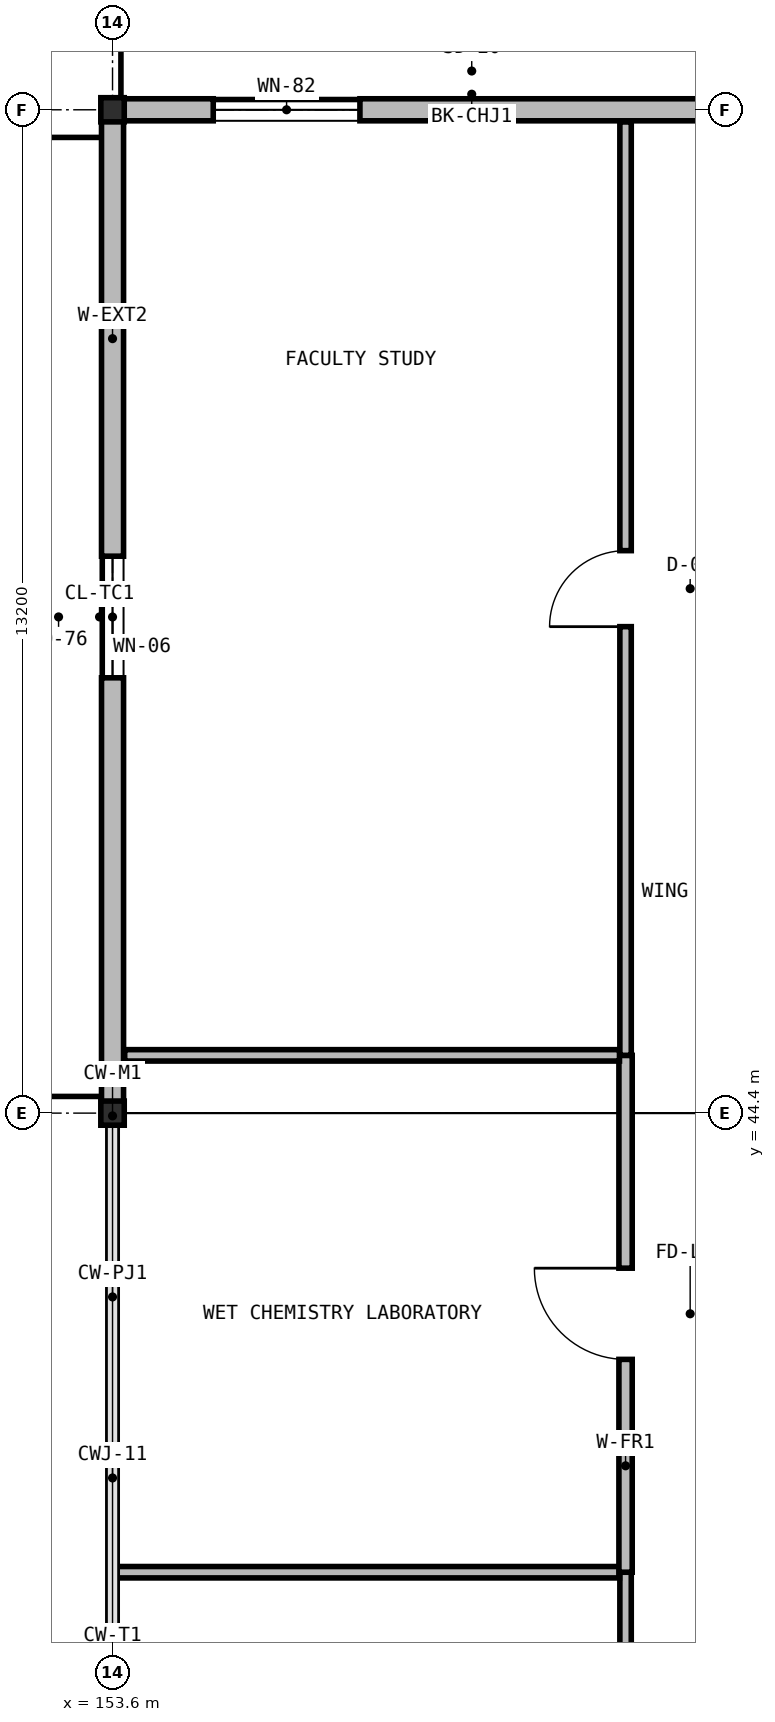
"""IFC4 building model, lengths in metres.
Left out: names, types, materials, properties, quantities, classifications, styles, units other than length and angle.
Written with IfcOpenShell. Run it as: python <this file> out.ifc"""

import sys

from ifc_helpers import new_model, si_unit, direction, frame, frame_2d, origin, origin_2d, place, context, subcontext, project, spatial, rectangle, i_section, extrude, element, fill, save


model = new_model("IFC4")
c1 = context("Model", 3, precision=1e-05, world=origin(), true_north=direction((0.0, 1.0)))
c2 = subcontext(c1, "Body", "Model", "MODEL_VIEW")
j1 = project(units=[si_unit("LENGTHUNIT", "METRE"), si_unit("PLANEANGLEUNIT", "RADIAN")], contexts=[c1])
p1 = place(None, origin())
s1 = spatial("IfcSite", under=j1, at=p1, CompositionType="ELEMENT")
p2 = place(p1, origin())
s2 = spatial("IfcBuilding", under=s1, at=p2, CompositionType="ELEMENT")
p3 = place(p2, frame((0.0, 0.0, 41.65)))
s3 = spatial("IfcBuildingStorey", under=s2, at=p3, CompositionType="ELEMENT", Elevation=41.65)
for number, where, z_axis, x_axis in (
    (1, (153.6, 44.4, 0.0), (0.0, 0.0, 1.0), (1.0, 0.0, 0.0)),
    (2, (153.6, 57.6, 0.0), (0.0, 0.0, 1.0), (1.0, 0.0, 0.0)),
):
    element("IfcColumn", number, at=place(p3, frame(where, z_axis=z_axis, x_axis=x_axis)), inside=s3, PredefinedType="COLUMN", context=c2, shape_type="SweptSolid", body=[
        extrude(i_section(OverallWidth=0.308, OverallDepth=0.318, WebThickness=0.013, FlangeThickness=0.021, at=origin_2d()), origin(), (0.0, 0.0, 1.0), 4.55),
    ])
p4 = place(p3, frame((153.6, 44.404, 0.0), z_axis=(0.0, 0.0, 1.0), x_axis=(0.0, 1.0, 0.0)))
e3 = element("IfcWall", 3, at=p4, inside=s3, PredefinedType="SOLIDWALL", context=c2, shape_type="SweptSolid", body=[
    extrude(rectangle(XDim=13.047, YDim=0.29, at=frame_2d((6.523, 0.0))), origin(), (0.0, 0.0, 1.0), 3.68),
])
p5 = place(p4, frame((5.723, 0.0, 0.95)))
e4 = element("IfcOpeningElement", 4, at=p5, cuts=e3, PredefinedType="OPENING", context=c2, shape_type="SweptSolid", body=[
    extrude(rectangle(XDim=1.6, YDim=1.4, at=frame_2d((0.8, 0.7))), frame((0.0, 0.155, 0.0), z_axis=(0.0, -1.0, 0.0), x_axis=(1.0, 0.0, 0.0)), (0.0, 0.0, 1.0), 0.31),
])
p6 = place(p3, frame((153.455, 57.6, 0.0), z_axis=(0.0, 0.0, 1.0), x_axis=(1.0, 0.0, 0.0)))
e5 = element("IfcWall", 5, at=p6, inside=s3, PredefinedType="SOLIDWALL", context=c2, shape_type="SweptSolid", body=[
    extrude(rectangle(XDim=9.741, YDim=0.29, at=frame_2d((4.871, 0.0))), origin(), (0.0, 0.0, 1.0), 3.748),
])
p7 = place(p6, frame((1.47, 0.0, 0.95)))
e6 = element("IfcOpeningElement", 6, at=p7, cuts=e5, PredefinedType="OPENING", context=c2, shape_type="SweptSolid", body=[
    extrude(rectangle(XDim=1.93, YDim=1.8, at=frame_2d((0.965, 0.9))), frame((0.0, 0.155, 0.0), z_axis=(0.0, -1.0, 0.0), x_axis=(1.0, 0.0, 0.0)), (0.0, 0.0, 1.0), 0.31),
])
p8 = place(p3, frame((160.35, 31.16, 0.0), z_axis=(0.0, 0.0, 1.0), x_axis=(0.0, 1.0, 0.0)))
e7 = element("IfcWall", 7, at=p8, inside=s3, PredefinedType="PARTITIONING", context=c2, shape_type="SweptSolid", body=[
    extrude(rectangle(XDim=7.2, YDim=0.15, at=frame_2d((3.6, 0.0))), origin(), (0.0, 0.0, 1.0), 4.3),
])
p9 = place(p8, frame((4.79, 0.0, 0.0)))
e8 = element("IfcOpeningElement", 8, at=p9, cuts=e7, PredefinedType="OPENING", context=c2, shape_type="SweptSolid", body=[
    extrude(rectangle(XDim=1.0, YDim=2.2, at=frame_2d((0.5, 1.1))), frame((0.0, 0.085, 0.0), z_axis=(0.0, -1.0, 0.0), x_axis=(1.0, 0.0, 0.0)), (0.0, 0.0, 1.0), 0.17),
])
p10 = place(p3, frame((153.66, 38.36, 0.0), z_axis=(0.0, 0.0, 1.0), x_axis=(1.0, 0.0, 0.0)))
e9 = element("IfcWall", 9, at=p10, inside=s3, PredefinedType="PARTITIONING", context=c2, shape_type="SweptSolid", body=[
    extrude(rectangle(XDim=6.61, YDim=0.15, at=frame_2d((3.305, 0.0))), origin(), (0.0, 0.0, 1.0), 4.3),
])
p11 = place(p3, frame((160.35, 38.36, 0.0), z_axis=(0.0, 0.0, 1.0), x_axis=(0.0, 1.0, 0.0)))
e10 = element("IfcWall", 10, at=p11, inside=s3, PredefinedType="PARTITIONING", context=c2, shape_type="SweptSolid", body=[
    extrude(rectangle(XDim=6.8, YDim=0.175, at=frame_2d((3.4, 0.0))), origin(), (0.0, 0.0, 1.0), 4.3),
])
p12 = place(p11, frame((2.8, 0.0, 0.0)))
e11 = element("IfcOpeningElement", 11, at=p12, cuts=e10, PredefinedType="OPENING", context=c2, shape_type="SweptSolid", body=[
    extrude(rectangle(XDim=1.2, YDim=2.2, at=frame_2d((0.6, 1.1))), frame((0.0, 0.097, 0.0), z_axis=(0.0, -1.0, 0.0), x_axis=(1.0, 0.0, 0.0)), (0.0, 0.0, 1.0), 0.195),
])
p13 = place(p3, frame((153.76, 45.16, 0.0), z_axis=(0.0, 0.0, 1.0), x_axis=(1.0, 0.0, 0.0)))
e12 = element("IfcWall", 12, at=p13, inside=s3, PredefinedType="PARTITIONING", context=c2, shape_type="SweptSolid", body=[
    extrude(rectangle(XDim=6.51, YDim=0.15, at=frame_2d((3.255, 0.0))), origin(), (0.0, 0.0, 1.0), 4.3),
])
p14 = place(p3, frame((160.35, 45.16, 0.0), z_axis=(0.0, 0.0, 1.0), x_axis=(0.0, 1.0, 0.0)))
e13 = element("IfcWall", 13, at=p14, inside=s3, PredefinedType="PARTITIONING", context=c2, shape_type="SweptSolid", body=[
    extrude(rectangle(XDim=12.28, YDim=0.15, at=frame_2d((6.14, 0.0))), origin(), (0.0, 0.0, 1.0), 4.3),
])
p15 = place(p14, frame((5.64, 0.0, 0.0)))
e14 = element("IfcOpeningElement", 14, at=p15, cuts=e13, PredefinedType="OPENING", context=c2, shape_type="SweptSolid", body=[
    extrude(rectangle(XDim=1.0, YDim=2.2, at=frame_2d((0.5, 1.1))), frame((0.0, 0.085, 0.0), z_axis=(0.0, -1.0, 0.0), x_axis=(1.0, 0.0, 0.0)), (0.0, 0.0, 1.0), 0.17),
])
p16 = place(p5, origin())
e15 = element("IfcWindow", 15, at=p16, inside=s3, PartitioningType="SINGLE_PANEL", PredefinedType="WINDOW", context=c2, shape_type="SweptSolid", body=[
    extrude(rectangle(XDim=1.6, YDim=1.4, at=frame_2d((0.8, 0.7))), frame((0.0, 0.03, 0.0), z_axis=(0.0, -1.0, 0.0), x_axis=(1.0, 0.0, 0.0)), (0.0, 0.0, 1.0), 0.06),
])
fill(e4, e15)
p17 = place(p7, origin())
e16 = element("IfcWindow", 16, at=p17, inside=s3, PartitioningType="SINGLE_PANEL", PredefinedType="WINDOW", context=c2, shape_type="SweptSolid", body=[
    extrude(rectangle(XDim=1.93, YDim=1.8, at=frame_2d((0.965, 0.9))), frame((0.0, 0.03, 0.0), z_axis=(0.0, -1.0, 0.0), x_axis=(1.0, 0.0, 0.0)), (0.0, 0.0, 1.0), 0.06),
])
fill(e6, e16)
p18 = place(p12, origin())
e17 = element("IfcDoor", 17, at=p18, inside=s3, OperationType="SINGLE_SWING_RIGHT", PredefinedType="DOOR", context=c2, shape_type="SweptSolid", body=[
    extrude(rectangle(XDim=1.2, YDim=2.2, at=frame_2d((0.6, 1.1))), frame((0.0, 0.025, 0.0), z_axis=(0.0, -1.0, 0.0), x_axis=(1.0, 0.0, 0.0)), (0.0, 0.0, 1.0), 0.05),
])
fill(e11, e17)
p19 = place(p15, origin())
e18 = element("IfcDoor", 18, at=p19, inside=s3, OperationType="SINGLE_SWING_LEFT", PredefinedType="DOOR", context=c2, shape_type="SweptSolid", body=[
    extrude(rectangle(XDim=1.0, YDim=2.2, at=frame_2d((0.5, 1.1))), frame((0.0, 0.025, 0.0), z_axis=(0.0, -1.0, 0.0), x_axis=(1.0, 0.0, 0.0)), (0.0, 0.0, 1.0), 0.05),
])
fill(e14, e18)
save(model, sys.argv[1])
